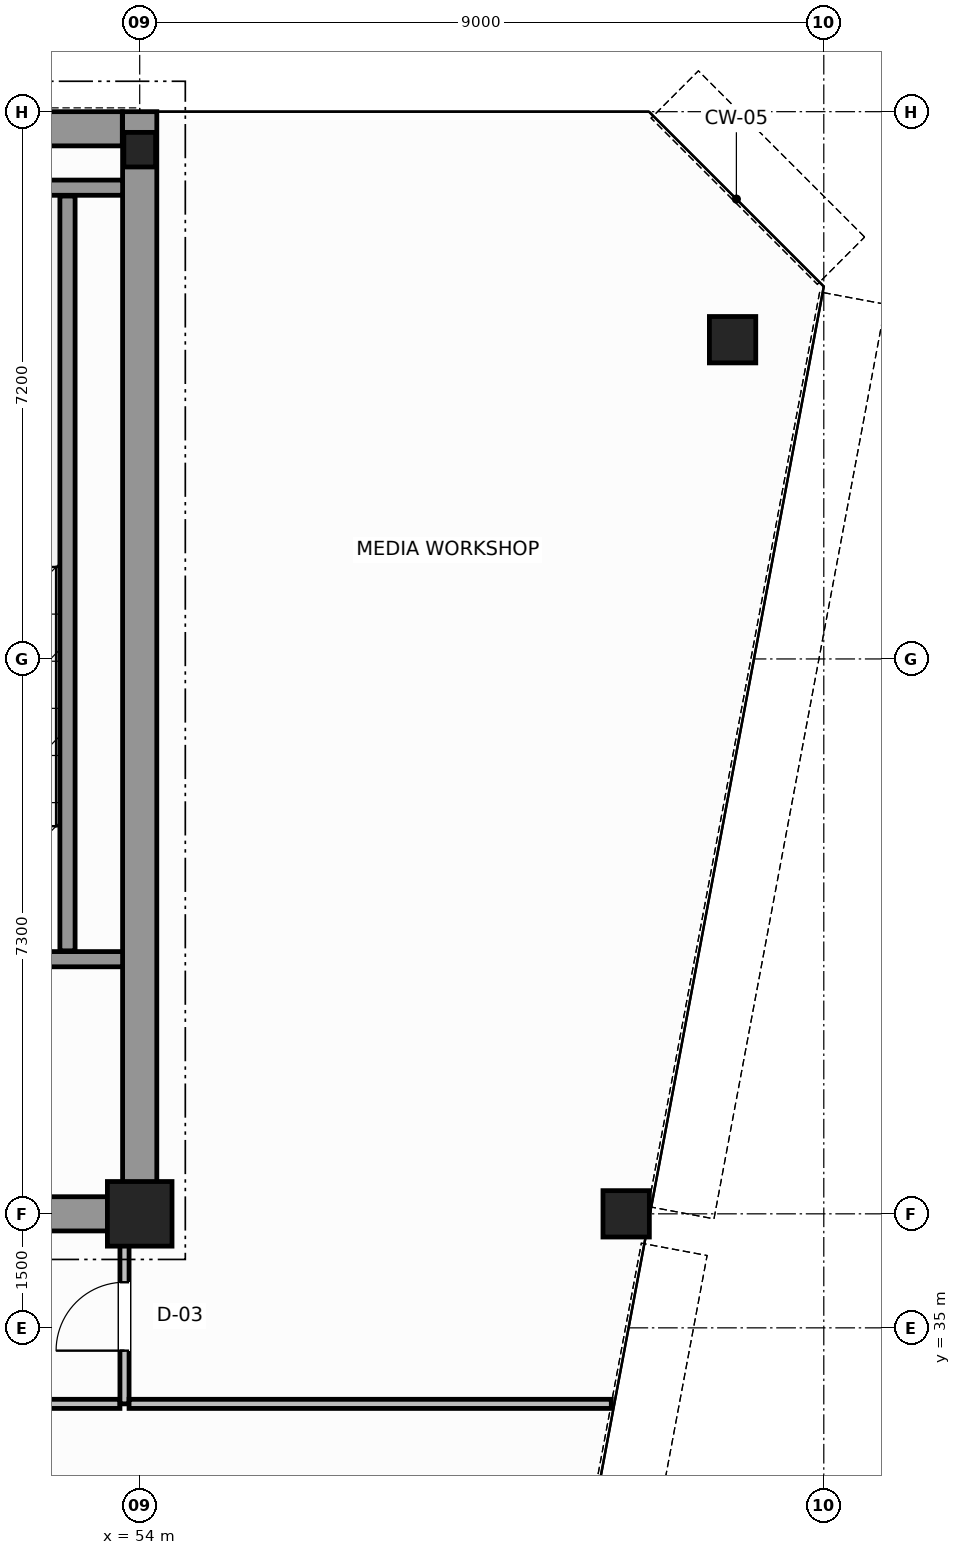
"""IFC4 building model, lengths in metres.
Left out: names, types, materials, properties, quantities, classifications, styles, units other than length and angle.
Written with IfcOpenShell. Run it as: python <this file> out.ifc"""

import sys

from ifc_helpers import new_model, si_unit, direction, frame, frame_2d, origin, origin_2d, place, context, subcontext, project, spatial, rectangle, hollow_circle, i_section, extrude, source, transform, mapped, element, fill, save


model = new_model("IFC4")
c1 = context("Model", 3, precision=1e-05, world=origin(), true_north=direction((0.0, 1.0)))
c2 = subcontext(c1, "Body", "Model", "MODEL_VIEW")
j1 = project(units=[si_unit("LENGTHUNIT", "METRE"), si_unit("PLANEANGLEUNIT", "RADIAN")], contexts=[c1])
p1 = place(None, origin())
s1 = spatial("IfcSite", under=j1, at=p1, CompositionType="ELEMENT")
p2 = place(p1, origin())
s2 = spatial("IfcBuilding", under=s1, at=p2, CompositionType="ELEMENT")
p3 = place(p2, frame((0.0, 0.0, 268.8)))
s3 = spatial("IfcBuildingStorey", under=s2, at=p3, CompositionType="ELEMENT", Elevation=268.8)
m1 = source(origin(), c2, "Body", "SweptSolid", [
    extrude(rectangle(XDim=0.85, YDim=0.85, at=origin_2d()), origin(), (0.0, 0.0, 1.0), 3.8),
])
p4 = place(p3, frame((54.0, 36.5, 0.0), z_axis=(0.0, 0.0, 1.0), x_axis=(1.0, 0.0, 0.0)))
e1 = element("IfcColumn", 1, at=p4, inside=s3, PredefinedType="COLUMN", context=c2, shape_type="MappedRepresentation", body=[
    mapped(m1, transform((0.0, 0.0, 0.0), scale=1.0)),
])
m2 = source(origin(), c2, "Body", "SweptSolid", [
    extrude(i_section(OverallWidth=0.418, OverallDepth=0.455, WebThickness=0.042, FlangeThickness=0.058, FilletRadius=0.015, at=origin_2d()), origin(), (0.0, 0.0, 1.0), 3.8),
])
p5 = place(p3, frame((54.0, 50.5, 0.0), z_axis=(0.0, 0.0, 1.0), x_axis=(1.0, 0.0, 0.0)))
e2 = element("IfcColumn", 2, at=p5, inside=s3, PredefinedType="COLUMN", context=c2, shape_type="MappedRepresentation", body=[
    mapped(m2, transform((0.0, 0.0, 0.0), scale=1.0)),
])
m3 = source(origin(), c2, "Body", "SweptSolid", [
    extrude(hollow_circle(Radius=0.305, WallThickness=0.03, at=origin_2d()), origin(), (0.0, 0.0, 1.0), 3.8),
])
for number, where, z_axis, x_axis in (
    (3, (61.8, 48.0, 0.0), (0.0, 0.0, 1.0), (1.0, 0.0, 0.0)),
    (4, (60.4, 36.5, 0.0), (0.0, 0.0, 1.0), (1.0, 0.0, 0.0)),
):
    element("IfcColumn", number, at=place(p3, frame(where, z_axis=z_axis, x_axis=x_axis)), inside=s3, PredefinedType="COLUMN", context=c2, shape_type="MappedRepresentation", body=[
        mapped(m3, transform((0.0, 0.0, 0.0), scale=1.0)),
    ])
p6 = place(p3, frame((34.002, 50.775, 0.0), z_axis=(0.0, 0.0, 1.0), x_axis=(1.0, 0.0, 0.0)))
e5 = element("IfcWall", 5, at=p6, inside=s3, PredefinedType="SHEAR", context=c2, shape_type="SweptSolid", body=[
    extrude(rectangle(XDim=19.769, YDim=0.45, at=frame_2d((9.885, 0.0))), origin(), (0.0, 0.0, 1.0), 3.8),
])
p7 = place(p3, frame((54.0, 36.5, 0.0), z_axis=(0.0, 0.0, 1.0), x_axis=(0.0, 1.0, 0.0)))
e6 = element("IfcWall", 6, at=p7, inside=s3, PredefinedType="SHEAR", context=c2, shape_type="SweptSolid", body=[
    extrude(rectangle(XDim=14.5, YDim=0.45, at=frame_2d((7.25, 0.0))), origin(), (0.0, 0.0, 1.0), 3.8),
])
p8 = place(p3, frame((49.8, 36.5, 0.0), z_axis=(0.0, 0.0, 1.0), x_axis=(1.0, 0.0, 0.0)))
e7 = element("IfcWall", 7, at=p8, inside=s3, PredefinedType="SHEAR", context=c2, shape_type="SweptSolid", body=[
    extrude(rectangle(XDim=3.955, YDim=0.45, at=frame_2d((1.978, 0.0))), origin(), (0.0, 0.0, 1.0), 2.58),
])
p9 = place(p3, frame((49.4, 39.85, 0.0), z_axis=(0.0, 0.0, 1.0), x_axis=(1.0, 0.0, 0.0)))
e8 = element("IfcWall", 8, at=p9, inside=s3, PredefinedType="SOLIDWALL", context=c2, shape_type="SweptSolid", body=[
    extrude(rectangle(XDim=4.375, YDim=0.2, at=frame_2d((2.188, 0.0))), origin(), (0.0, 0.0, 1.0), 3.8),
])
p10 = place(p9, frame((1.325, 0.0, 0.0)))
e9 = element("IfcOpeningElement", 9, at=p10, cuts=e8, PredefinedType="OPENING", context=c2, shape_type="SweptSolid", body=[
    extrude(rectangle(XDim=1.1, YDim=2.15, at=frame_2d((0.55, 1.075))), frame((0.0, 0.11, 0.0), z_axis=(0.0, -1.0, 0.0), x_axis=(1.0, 0.0, 0.0)), (0.0, 0.0, 1.0), 0.22),
])
p11 = place(p3, frame((49.4, 50.0, 0.0), z_axis=(0.0, 0.0, 1.0), x_axis=(1.0, 0.0, 0.0)))
e10 = element("IfcWall", 10, at=p11, inside=s3, PredefinedType="SOLIDWALL", context=c2, shape_type="SweptSolid", body=[
    extrude(rectangle(XDim=4.375, YDim=0.2, at=frame_2d((2.188, 0.0))), origin(), (0.0, 0.0, 1.0), 3.8),
])
p12 = place(p3, frame((53.05, 39.96, 0.0), z_axis=(0.0, 0.0, 1.0), x_axis=(0.0, 1.0, 0.0)))
e11 = element("IfcWall", 11, at=p12, inside=s3, PredefinedType="SOLIDWALL", context=c2, shape_type="SweptSolid", body=[
    extrude(rectangle(XDim=9.93, YDim=0.2, at=frame_2d((4.965, 0.0))), origin(), (0.0, 0.0, 1.0), 3.8),
])
p13 = place(p3, frame((27.26, 34.0, 0.0), z_axis=(0.0, 0.0, 1.0), x_axis=(1.0, 0.0, 0.0)))
e12 = element("IfcWall", 12, at=p13, inside=s3, PredefinedType="PARTITIONING", context=c2, shape_type="SweptSolid", body=[
    extrude(rectangle(XDim=26.48, YDim=0.12, at=frame_2d((13.24, 0.0))), origin(), (0.0, 0.0, 1.0), 3.58),
])
p14 = place(p3, frame((53.8, 34.0, 0.0), z_axis=(0.0, 0.0, 1.0), x_axis=(0.0, 1.0, 0.0)))
e13 = element("IfcWall", 13, at=p14, inside=s3, PredefinedType="PARTITIONING", context=c2, shape_type="SweptSolid", body=[
    extrude(rectangle(XDim=2.44, YDim=0.12, at=frame_2d((1.22, 0.0))), origin(), (0.0, 0.0, 1.0), 3.58),
])
p15 = place(p14, frame((0.7, 0.0, 0.0)))
e14 = element("IfcOpeningElement", 14, at=p15, cuts=e13, PredefinedType="OPENING", context=c2, shape_type="SweptSolid", body=[
    extrude(rectangle(XDim=0.9, YDim=2.15, at=frame_2d((0.45, 1.075))), frame((0.0, 0.07, 0.0), z_axis=(0.0, -1.0, 0.0), x_axis=(1.0, 0.0, 0.0)), (0.0, 0.0, 1.0), 0.14),
])
p16 = place(p3, frame((53.86, 34.0, 0.0), z_axis=(0.0, 0.0, 1.0), x_axis=(1.0, 0.0, 0.0)))
e15 = element("IfcWall", 15, at=p16, inside=s3, PredefinedType="PARTITIONING", context=c2, shape_type="SweptSolid", body=[
    extrude(rectangle(XDim=6.344, YDim=0.12, at=frame_2d((3.172, 0.0))), origin(), (0.0, 0.0, 1.0), 3.58),
])
m4 = source(origin(), c2, "Body", "SweptSolid", [
    extrude(rectangle(XDim=0.9, YDim=2.15, at=frame_2d((0.45, 1.075))), frame((0.0, 0.025, 0.0), z_axis=(0.0, -1.0, 0.0), x_axis=(1.0, 0.0, 0.0)), (0.0, 0.0, 1.0), 0.05),
])
p17 = place(p15, origin())
e16 = element("IfcDoor", 16, at=p17, inside=s3, OperationType="SINGLE_SWING_RIGHT", PredefinedType="DOOR", context=c2, shape_type="MappedRepresentation", body=[
    mapped(m4, transform((0.0, 0.0, 0.0), scale=1.0)),
])
fill(e14, e16)
save(model, sys.argv[1])
